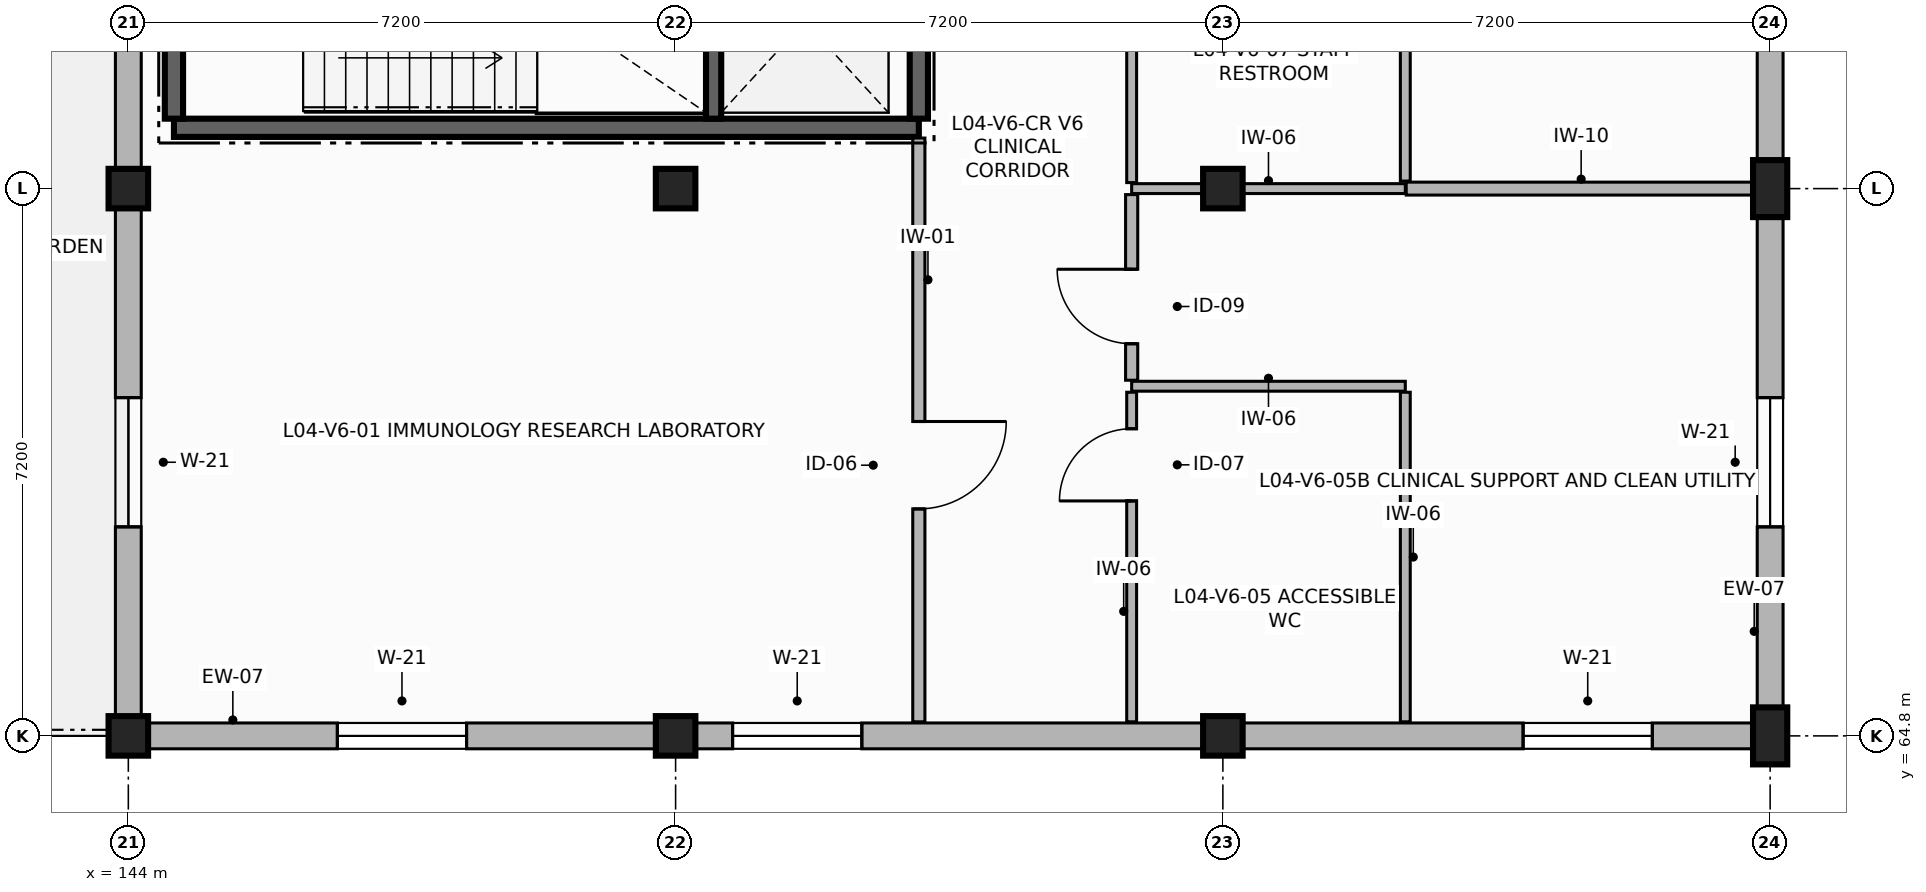
"""IFC4 building model, lengths in metres.
Left out: names, types, materials, properties, quantities, classifications, styles, units other than length and angle.
Written with IfcOpenShell. Run it as: python <this file> out.ifc"""

import sys

from ifc_helpers import new_model, si_unit, direction, frame, frame_2d, origin, origin_2d, place, context, subcontext, project, spatial, rectangle, extrude, element, fill, save


model = new_model("IFC4")
c1 = context("Model", 3, precision=1e-05, world=origin(), true_north=direction((0.0, 1.0)))
c2 = subcontext(c1, "Body", "Model", "MODEL_VIEW")
j1 = project(units=[si_unit("LENGTHUNIT", "METRE"), si_unit("PLANEANGLEUNIT", "RADIAN")], contexts=[c1])
p1 = place(None, origin())
s1 = spatial("IfcSite", under=j1, at=p1, CompositionType="ELEMENT")
p2 = place(p1, origin())
s2 = spatial("IfcBuilding", under=s1, at=p2, CompositionType="ELEMENT")
p3 = place(p2, frame((0.0, 0.0, 16.0)))
s3 = spatial("IfcBuildingStorey", under=s2, at=p3, CompositionType="ELEMENT", Elevation=16.0)
for number, where, z_axis, x_axis in (
    (1, (144.0, 64.8, 0.0), (0.0, 0.0, 1.0), (1.0, 0.0, 0.0)),
    (2, (144.0, 72.0, 0.0), (0.0, 0.0, 1.0), (1.0, 0.0, 0.0)),
    (3, (151.2, 64.8, 0.0), (0.0, 0.0, 1.0), (1.0, 0.0, 0.0)),
    (4, (151.2, 72.0, 0.0), (0.0, 0.0, 1.0), (1.0, 0.0, 0.0)),
    (5, (158.4, 64.8, 0.0), (0.0, 0.0, 1.0), (1.0, 0.0, 0.0)),
    (6, (158.4, 72.0, 0.0), (0.0, 0.0, 1.0), (1.0, 0.0, 0.0)),
):
    element("IfcColumn", number, at=place(p3, frame(where, z_axis=z_axis, x_axis=x_axis)), inside=s3, PredefinedType="COLUMN", context=c2, shape_type="SweptSolid", body=[
        extrude(rectangle(XDim=0.52, YDim=0.52, at=origin_2d()), origin(), (0.0, 0.0, 1.0), 3.38),
    ])
for number, where, z_axis, x_axis in (
    (7, (165.6, 64.8, 0.0), (0.0, 0.0, 1.0), (1.0, 0.0, 0.0)),
    (8, (165.6, 72.0, 0.0), (0.0, 0.0, 1.0), (1.0, 0.0, 0.0)),
):
    element("IfcColumn", number, at=place(p3, frame(where, z_axis=z_axis, x_axis=x_axis)), inside=s3, PredefinedType="PILASTER", context=c2, shape_type="SweptSolid", body=[
        extrude(rectangle(XDim=0.45, YDim=0.75, at=origin_2d()), origin(), (0.0, 0.0, 1.0), 3.38),
    ])
p4 = place(p3, frame((144.0, 64.8, 0.0), z_axis=(0.0, 0.0, 1.0), x_axis=(1.0, 0.0, 0.0)))
e9 = element("IfcWall", 9, at=p4, inside=s3, PredefinedType="SOLIDWALL", context=c2, shape_type="SweptSolid", body=[
    extrude(rectangle(XDim=7.2, YDim=0.34, at=frame_2d((3.6, 0.0))), origin(), (0.0, 0.0, 1.0), 2.71),
])
p5 = place(p4, frame((2.75, 0.0, 0.85)))
e10 = element("IfcOpeningElement", 10, at=p5, cuts=e9, PredefinedType="OPENING", context=c2, shape_type="SweptSolid", body=[
    extrude(rectangle(XDim=1.7, YDim=1.65, at=frame_2d((0.85, 0.825))), frame((0.0, 0.18, 0.0), z_axis=(0.0, -1.0, 0.0), x_axis=(1.0, 0.0, 0.0)), (0.0, 0.0, 1.0), 0.36),
])
p6 = place(p3, frame((151.2, 64.8, 0.0), z_axis=(0.0, 0.0, 1.0), x_axis=(1.0, 0.0, 0.0)))
e11 = element("IfcWall", 11, at=p6, inside=s3, PredefinedType="SOLIDWALL", context=c2, shape_type="SweptSolid", body=[
    extrude(rectangle(XDim=7.2, YDim=0.34, at=frame_2d((3.6, 0.0))), origin(), (0.0, 0.0, 1.0), 2.71),
])
p7 = place(p6, frame((0.75, 0.0, 0.85)))
e12 = element("IfcOpeningElement", 12, at=p7, cuts=e11, PredefinedType="OPENING", context=c2, shape_type="SweptSolid", body=[
    extrude(rectangle(XDim=1.7, YDim=1.65, at=frame_2d((0.85, 0.825))), frame((0.0, 0.18, 0.0), z_axis=(0.0, -1.0, 0.0), x_axis=(1.0, 0.0, 0.0)), (0.0, 0.0, 1.0), 0.36),
])
p8 = place(p3, frame((158.4, 64.8, 0.0), z_axis=(0.0, 0.0, 1.0), x_axis=(1.0, 0.0, 0.0)))
e13 = element("IfcWall", 13, at=p8, inside=s3, PredefinedType="SOLIDWALL", context=c2, shape_type="SweptSolid", body=[
    extrude(rectangle(XDim=7.2, YDim=0.34, at=frame_2d((3.6, 0.0))), origin(), (0.0, 0.0, 1.0), 2.71),
])
p9 = place(p8, frame((3.95, 0.0, 0.85)))
e14 = element("IfcOpeningElement", 14, at=p9, cuts=e13, PredefinedType="OPENING", context=c2, shape_type="SweptSolid", body=[
    extrude(rectangle(XDim=1.7, YDim=1.65, at=frame_2d((0.85, 0.825))), frame((0.0, 0.18, 0.0), z_axis=(0.0, -1.0, 0.0), x_axis=(1.0, 0.0, 0.0)), (0.0, 0.0, 1.0), 0.36),
])
p10 = place(p3, frame((165.6, 64.8, 0.0), z_axis=(0.0, 0.0, 1.0), x_axis=(0.0, 1.0, 0.0)))
e15 = element("IfcWall", 15, at=p10, inside=s3, PredefinedType="SOLIDWALL", context=c2, shape_type="SweptSolid", body=[
    extrude(rectangle(XDim=7.2, YDim=0.34, at=frame_2d((3.6, 0.0))), origin(), (0.0, 0.0, 1.0), 2.71),
])
p11 = place(p10, frame((2.75, 0.0, 0.85)))
e16 = element("IfcOpeningElement", 16, at=p11, cuts=e15, PredefinedType="OPENING", context=c2, shape_type="SweptSolid", body=[
    extrude(rectangle(XDim=1.7, YDim=1.65, at=frame_2d((0.85, 0.825))), frame((0.0, 0.18, 0.0), z_axis=(0.0, -1.0, 0.0), x_axis=(1.0, 0.0, 0.0)), (0.0, 0.0, 1.0), 0.36),
])
p12 = place(p3, frame((165.6, 72.0, 0.0), z_axis=(0.0, 0.0, 1.0), x_axis=(0.0, 1.0, 0.0)))
e17 = element("IfcWall", 17, at=p12, inside=s3, PredefinedType="SOLIDWALL", context=c2, shape_type="SweptSolid", body=[
    extrude(rectangle(XDim=7.2, YDim=0.34, at=frame_2d((3.6, 0.0))), origin(), (0.0, 0.0, 1.0), 2.71),
])
p13 = place(p12, frame((2.75, 0.0, 0.85)))
e18 = element("IfcOpeningElement", 18, at=p13, cuts=e17, PredefinedType="OPENING", context=c2, shape_type="SweptSolid", body=[
    extrude(rectangle(XDim=1.7, YDim=1.65, at=frame_2d((0.85, 0.825))), frame((0.0, 0.18, 0.0), z_axis=(0.0, -1.0, 0.0), x_axis=(1.0, 0.0, 0.0)), (0.0, 0.0, 1.0), 0.36),
])
p14 = place(p3, frame((144.0, 79.2, 0.0), z_axis=(0.0, 0.0, 1.0), x_axis=(0.0, -1.0, 0.0)))
e19 = element("IfcWall", 19, at=p14, inside=s3, PredefinedType="SOLIDWALL", context=c2, shape_type="SweptSolid", body=[
    extrude(rectangle(XDim=7.2, YDim=0.34, at=frame_2d((3.6, 0.0))), origin(), (0.0, 0.0, 1.0), 2.71),
])
p15 = place(p3, frame((144.0, 72.0, 0.0), z_axis=(0.0, 0.0, 1.0), x_axis=(0.0, -1.0, 0.0)))
e20 = element("IfcWall", 20, at=p15, inside=s3, PredefinedType="SOLIDWALL", context=c2, shape_type="SweptSolid", body=[
    extrude(rectangle(XDim=7.2, YDim=0.34, at=frame_2d((3.6, 0.0))), origin(), (0.0, 0.0, 1.0), 2.71),
])
p16 = place(p15, frame((2.75, 0.0, 0.85)))
e21 = element("IfcOpeningElement", 21, at=p16, cuts=e20, PredefinedType="OPENING", context=c2, shape_type="SweptSolid", body=[
    extrude(rectangle(XDim=1.7, YDim=1.65, at=frame_2d((0.85, 0.825))), frame((0.0, 0.18, 0.0), z_axis=(0.0, -1.0, 0.0), x_axis=(1.0, 0.0, 0.0)), (0.0, 0.0, 1.0), 0.36),
])
p17 = place(p3, frame((144.6, 72.8, 0.0), z_axis=(0.0, 0.0, 1.0), x_axis=(1.0, 0.0, 0.0)))
e22 = element("IfcWall", 22, at=p17, inside=s3, PredefinedType="SHEAR", context=c2, shape_type="SweptSolid", body=[
    extrude(rectangle(XDim=9.8, YDim=0.24, at=frame_2d((4.9, 0.0))), origin(), (0.0, 0.0, 1.0), 3.38),
])
p18 = place(p3, frame((154.4, 72.92, 0.0), z_axis=(0.0, 0.0, 1.0), x_axis=(0.0, 1.0, 0.0)))
e23 = element("IfcWall", 23, at=p18, inside=s3, PredefinedType="SHEAR", context=c2, shape_type="SweptSolid", body=[
    extrude(rectangle(XDim=5.56, YDim=0.24, at=frame_2d((2.78, 0.0))), origin(), (0.0, 0.0, 1.0), 3.38),
])
p19 = place(p18, frame((4.09, 0.0, 0.0)))
e24 = element("IfcOpeningElement", 24, at=p19, cuts=e23, PredefinedType="OPENING", context=c2, shape_type="SweptSolid", body=[
    extrude(rectangle(XDim=1.15, YDim=2.2, at=frame_2d((0.575, 1.1))), frame((0.0, 0.13, 0.0), z_axis=(0.0, -1.0, 0.0), x_axis=(1.0, 0.0, 0.0)), (0.0, 0.0, 1.0), 0.26),
])
p20 = place(p3, frame((144.6, 78.48, 0.0), z_axis=(0.0, 0.0, 1.0), x_axis=(0.0, -1.0, 0.0)))
e25 = element("IfcWall", 25, at=p20, inside=s3, PredefinedType="SHEAR", context=c2, shape_type="SweptSolid", body=[
    extrude(rectangle(XDim=5.56, YDim=0.24, at=frame_2d((2.78, 0.0))), origin(), (0.0, 0.0, 1.0), 3.38),
])
p21 = place(p3, frame((151.7, 72.92, 0.0), z_axis=(0.0, 0.0, 1.0), x_axis=(0.0, 1.0, 0.0)))
e26 = element("IfcWall", 26, at=p21, inside=s3, PredefinedType="SHEAR", context=c2, shape_type="SweptSolid", body=[
    extrude(rectangle(XDim=3.68, YDim=0.2, at=frame_2d((1.84, 0.0))), origin(), (0.0, 0.0, 1.0), 3.38),
])
p22 = place(p3, frame((154.4, 72.665, 0.0), z_axis=(0.0, 0.0, 1.0), x_axis=(0.0, -1.0, 0.0)))
e27 = element("IfcWall", 27, at=p22, inside=s3, PredefinedType="PARTITIONING", context=c2, shape_type="SweptSolid", body=[
    extrude(rectangle(XDim=7.68, YDim=0.16, at=frame_2d((3.84, 0.0))), origin(), (0.0, 0.0, 1.0), 2.69),
])
p23 = place(p22, frame((3.729, 0.0, 0.0)))
e28 = element("IfcOpeningElement", 28, at=p23, cuts=e27, PredefinedType="OPENING", context=c2, shape_type="SweptSolid", body=[
    extrude(rectangle(XDim=1.15, YDim=2.25, at=frame_2d((0.575, 1.125))), frame((0.0, 0.09, 0.0), z_axis=(0.0, -1.0, 0.0), x_axis=(1.0, 0.0, 0.0)), (0.0, 0.0, 1.0), 0.18),
])
p24 = place(p3, frame((157.2, 69.4, 0.0), z_axis=(0.0, 0.0, 1.0), x_axis=(1.0, 0.0, 0.0)))
e29 = element("IfcWall", 29, at=p24, inside=s3, PredefinedType="PARTITIONING", context=c2, shape_type="SweptSolid", body=[
    extrude(rectangle(XDim=3.6, YDim=0.13, at=frame_2d((1.8, 0.0))), origin(), (0.0, 0.0, 1.0), 2.69),
])
p25 = place(p3, frame((160.8, 69.321, 0.0), z_axis=(0.0, 0.0, 1.0), x_axis=(0.0, -1.0, 0.0)))
e30 = element("IfcWall", 30, at=p25, inside=s3, PredefinedType="PARTITIONING", context=c2, shape_type="SweptSolid", body=[
    extrude(rectangle(XDim=4.336, YDim=0.13, at=frame_2d((2.168, 0.0))), origin(), (0.0, 0.0, 1.0), 2.69),
])
p26 = place(p3, frame((157.2, 64.985, 0.0), z_axis=(0.0, 0.0, 1.0), x_axis=(0.0, 1.0, 0.0)))
e31 = element("IfcWall", 31, at=p26, inside=s3, PredefinedType="PARTITIONING", context=c2, shape_type="SweptSolid", body=[
    extrude(rectangle(XDim=4.336, YDim=0.13, at=frame_2d((2.168, 0.0))), origin(), (0.0, 0.0, 1.0), 2.69),
])
p27 = place(p26, frame((2.906, 0.0, 0.0)))
e32 = element("IfcOpeningElement", 32, at=p27, cuts=e31, PredefinedType="OPENING", context=c2, shape_type="SweptSolid", body=[
    extrude(rectangle(XDim=0.95, YDim=2.1, at=frame_2d((0.475, 1.05))), frame((0.0, 0.075, 0.0), z_axis=(0.0, -1.0, 0.0), x_axis=(1.0, 0.0, 0.0)), (0.0, 0.0, 1.0), 0.15),
])
p28 = place(p3, frame((157.2, 72.0, 0.0), z_axis=(0.0, 0.0, 1.0), x_axis=(1.0, 0.0, 0.0)))
e33 = element("IfcWall", 33, at=p28, inside=s3, PredefinedType="PARTITIONING", context=c2, shape_type="SweptSolid", body=[
    extrude(rectangle(XDim=3.6, YDim=0.13, at=frame_2d((1.8, 0.0))), origin(), (0.0, 0.0, 1.0), 2.69),
])
p29 = place(p3, frame((160.812, 72.0, 0.0), z_axis=(0.0, 0.0, 1.0), x_axis=(1.0, 0.0, 0.0)))
e34 = element("IfcWall", 34, at=p29, inside=s3, PredefinedType="PARTITIONING", context=c2, shape_type="SweptSolid", body=[
    extrude(rectangle(XDim=4.603, YDim=0.17, at=frame_2d((2.302, 0.0))), origin(), (0.0, 0.0, 1.0), 2.69),
])
p30 = place(p3, frame((157.2, 69.479, 0.0), z_axis=(0.0, 0.0, 1.0), x_axis=(0.0, 1.0, 0.0)))
e35 = element("IfcWall", 35, at=p30, inside=s3, PredefinedType="PARTITIONING", context=c2, shape_type="SweptSolid", body=[
    extrude(rectangle(XDim=2.442, YDim=0.16, at=frame_2d((1.221, 0.0))), origin(), (0.0, 0.0, 1.0), 2.69),
])
p31 = place(p30, frame((0.48, 0.0, 0.0)))
e36 = element("IfcOpeningElement", 36, at=p31, cuts=e35, PredefinedType="OPENING", context=c2, shape_type="SweptSolid", body=[
    extrude(rectangle(XDim=0.98, YDim=2.15, at=frame_2d((0.49, 1.075))), frame((0.0, 0.09, 0.0), z_axis=(0.0, -1.0, 0.0), x_axis=(1.0, 0.0, 0.0)), (0.0, 0.0, 1.0), 0.18),
])
p32 = place(p3, frame((160.8, 76.521, 0.0), z_axis=(0.0, 0.0, 1.0), x_axis=(0.0, -1.0, 0.0)))
e37 = element("IfcWall", 37, at=p32, inside=s3, PredefinedType="PARTITIONING", context=c2, shape_type="SweptSolid", body=[
    extrude(rectangle(XDim=4.422, YDim=0.13, at=frame_2d((2.211, 0.0))), origin(), (0.0, 0.0, 1.0), 2.69),
])
p33 = place(p3, frame((157.2, 72.079, 0.0), z_axis=(0.0, 0.0, 1.0), x_axis=(0.0, 1.0, 0.0)))
e38 = element("IfcWall", 38, at=p33, inside=s3, PredefinedType="PARTITIONING", context=c2, shape_type="SweptSolid", body=[
    extrude(rectangle(XDim=4.442, YDim=0.13, at=frame_2d((2.221, 0.0))), origin(), (0.0, 0.0, 1.0), 2.69),
])
p34 = place(p33, frame((3.062, 0.0, 0.0)))
e39 = element("IfcOpeningElement", 39, at=p34, cuts=e38, PredefinedType="OPENING", context=c2, shape_type="SweptSolid", body=[
    extrude(rectangle(XDim=0.9, YDim=2.1, at=frame_2d((0.45, 1.05))), frame((0.0, 0.075, 0.0), z_axis=(0.0, -1.0, 0.0), x_axis=(1.0, 0.0, 0.0)), (0.0, 0.0, 1.0), 0.15),
])
p35 = place(p5, origin())
e40 = element("IfcWindow", 40, at=p35, inside=s3, PartitioningType="SINGLE_PANEL", PredefinedType="WINDOW", context=c2, shape_type="SweptSolid", body=[
    extrude(rectangle(XDim=1.7, YDim=1.65, at=frame_2d((0.85, 0.825))), frame((0.0, 0.03, 0.0), z_axis=(0.0, -1.0, 0.0), x_axis=(1.0, 0.0, 0.0)), (0.0, 0.0, 1.0), 0.06),
])
fill(e10, e40)
p36 = place(p7, origin())
e41 = element("IfcWindow", 41, at=p36, inside=s3, PartitioningType="SINGLE_PANEL", PredefinedType="WINDOW", context=c2, shape_type="SweptSolid", body=[
    extrude(rectangle(XDim=1.7, YDim=1.65, at=frame_2d((0.85, 0.825))), frame((0.0, 0.03, 0.0), z_axis=(0.0, -1.0, 0.0), x_axis=(1.0, 0.0, 0.0)), (0.0, 0.0, 1.0), 0.06),
])
fill(e12, e41)
p37 = place(p9, origin())
e42 = element("IfcWindow", 42, at=p37, inside=s3, PartitioningType="SINGLE_PANEL", PredefinedType="WINDOW", context=c2, shape_type="SweptSolid", body=[
    extrude(rectangle(XDim=1.7, YDim=1.65, at=frame_2d((0.85, 0.825))), frame((0.0, 0.03, 0.0), z_axis=(0.0, -1.0, 0.0), x_axis=(1.0, 0.0, 0.0)), (0.0, 0.0, 1.0), 0.06),
])
fill(e14, e42)
p38 = place(p11, origin())
e43 = element("IfcWindow", 43, at=p38, inside=s3, PartitioningType="SINGLE_PANEL", PredefinedType="WINDOW", context=c2, shape_type="SweptSolid", body=[
    extrude(rectangle(XDim=1.7, YDim=1.65, at=frame_2d((0.85, 0.825))), frame((0.0, 0.03, 0.0), z_axis=(0.0, -1.0, 0.0), x_axis=(1.0, 0.0, 0.0)), (0.0, 0.0, 1.0), 0.06),
])
fill(e16, e43)
p39 = place(p16, origin())
e44 = element("IfcWindow", 44, at=p39, inside=s3, PartitioningType="SINGLE_PANEL", PredefinedType="WINDOW", context=c2, shape_type="SweptSolid", body=[
    extrude(rectangle(XDim=1.7, YDim=1.65, at=frame_2d((0.85, 0.825))), frame((0.0, 0.03, 0.0), z_axis=(0.0, -1.0, 0.0), x_axis=(1.0, 0.0, 0.0)), (0.0, 0.0, 1.0), 0.06),
])
fill(e21, e44)
p40 = place(p23, origin())
e45 = element("IfcDoor", 45, at=p40, inside=s3, OperationType="SINGLE_SWING_LEFT", PredefinedType="DOOR", context=c2, shape_type="SweptSolid", body=[
    extrude(rectangle(XDim=1.15, YDim=2.25, at=frame_2d((0.575, 1.125))), frame((0.0, 0.025, 0.0), z_axis=(0.0, -1.0, 0.0), x_axis=(1.0, 0.0, 0.0)), (0.0, 0.0, 1.0), 0.05),
])
fill(e28, e45)
p41 = place(p27, origin())
e46 = element("IfcDoor", 46, at=p41, inside=s3, OperationType="SINGLE_SWING_LEFT", PredefinedType="DOOR", context=c2, shape_type="SweptSolid", body=[
    extrude(rectangle(XDim=0.95, YDim=2.1, at=frame_2d((0.475, 1.05))), frame((0.0, 0.025, 0.0), z_axis=(0.0, -1.0, 0.0), x_axis=(1.0, 0.0, 0.0)), (0.0, 0.0, 1.0), 0.05),
])
fill(e32, e46)
p42 = place(p31, origin())
e47 = element("IfcDoor", 47, at=p42, inside=s3, OperationType="SINGLE_SWING_RIGHT", PredefinedType="DOOR", context=c2, shape_type="SweptSolid", body=[
    extrude(rectangle(XDim=0.98, YDim=2.15, at=frame_2d((0.49, 1.075))), frame((0.0, 0.025, 0.0), z_axis=(0.0, -1.0, 0.0), x_axis=(1.0, 0.0, 0.0)), (0.0, 0.0, 1.0), 0.05),
])
fill(e36, e47)
save(model, sys.argv[1])
